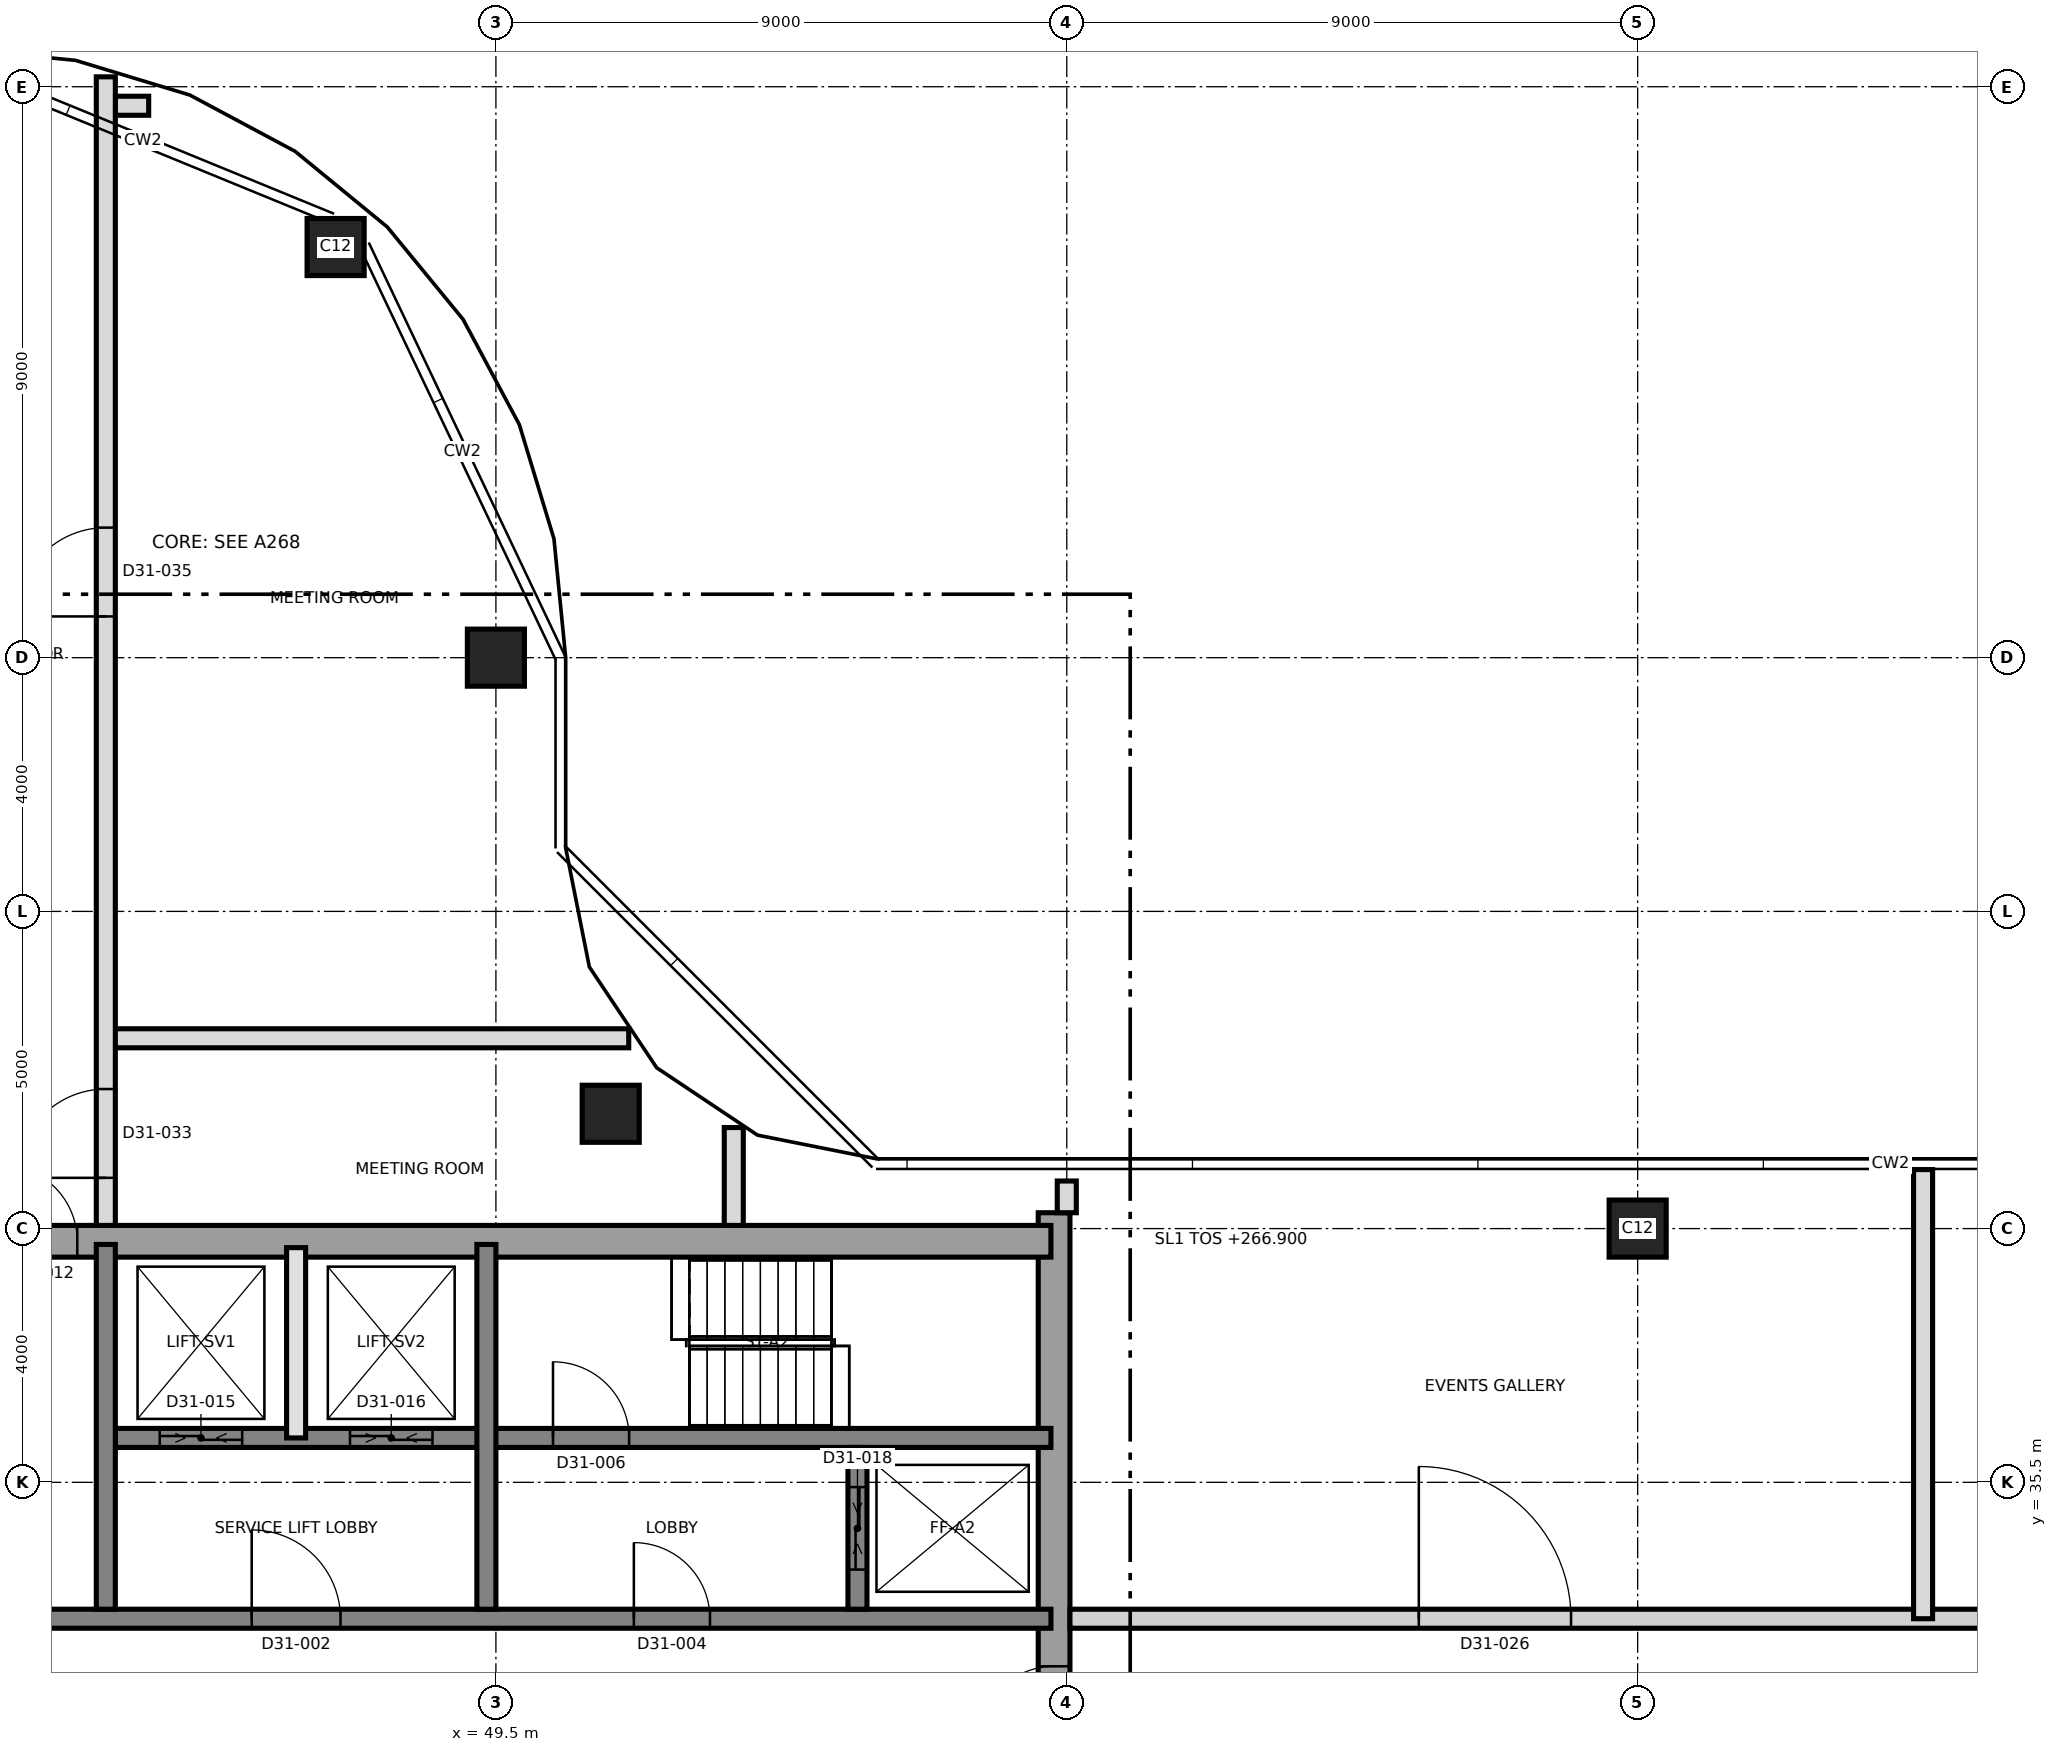
"""IFC4 building model, lengths in metres.
Left out: names, types, materials, properties, quantities, classifications, styles, units other than length and angle.
Written with IfcOpenShell. Run it as: python <this file> out.ifc"""

import sys

from ifc_helpers import new_model, si_unit, direction, frame, frame_2d, origin, origin_2d, place, context, subcontext, project, spatial, rectangle, extrude, element, fill, save


model = new_model("IFC4")
c1 = context("Model", 3, precision=1e-05, world=origin(), true_north=direction((0.0, 1.0)))
c2 = subcontext(c1, "Body", "Model", "MODEL_VIEW")
j1 = project(units=[si_unit("LENGTHUNIT", "METRE"), si_unit("PLANEANGLEUNIT", "RADIAN")], contexts=[c1])
p1 = place(None, origin())
s1 = spatial("IfcSite", under=j1, at=p1, CompositionType="ELEMENT")
p2 = place(p1, origin())
s2 = spatial("IfcBuilding", under=s1, at=p2, CompositionType="ELEMENT")
p3 = place(p2, frame((0.0, 0.0, 266.9)))
s3 = spatial("IfcBuildingStorey", under=s2, at=p3, CompositionType="ELEMENT", Elevation=266.9)
p4 = place(p3, frame((58.3, 21.25, 0.0), z_axis=(0.0, 0.0, 1.0), x_axis=(0.0, 1.0, 0.0)))
e1 = element("IfcWall", 1, at=p4, inside=s3, PredefinedType="SHEAR", context=c2, shape_type="SweptSolid", body=[
    extrude(rectangle(XDim=18.5, YDim=0.5, at=frame_2d((9.25, 0.0))), origin(), (0.0, 0.0, 1.0), 6.0),
])
p5 = place(p4, frame((10.15, 0.0, 0.0)))
e2 = element("IfcOpeningElement", 2, at=p5, cuts=e1, PredefinedType="OPENING", context=c2, shape_type="SweptSolid", body=[
    extrude(rectangle(XDim=1.2, YDim=2.1, at=frame_2d((0.6, 1.05))), frame((0.0, 0.26, 0.0), z_axis=(0.0, -1.0, 0.0), x_axis=(1.0, 0.0, 0.0)), (0.0, 0.0, 1.0), 0.52),
])
p6 = place(p3, frame((31.25, 39.3, 0.0), z_axis=(0.0, 0.0, 1.0), x_axis=(1.0, 0.0, 0.0)))
e3 = element("IfcWall", 3, at=p6, inside=s3, PredefinedType="SHEAR", context=c2, shape_type="SweptSolid", body=[
    extrude(rectangle(XDim=27.0, YDim=0.5, at=frame_2d((13.5, 0.0))), origin(), (0.0, 0.0, 1.0), 6.0),
])
p7 = place(p6, frame((10.45, 0.0, 0.0)))
e4 = element("IfcOpeningElement", 4, at=p7, cuts=e3, PredefinedType="OPENING", context=c2, shape_type="SweptSolid", body=[
    extrude(rectangle(XDim=1.2, YDim=2.1, at=frame_2d((0.6, 1.05))), frame((0.0, 0.26, 0.0), z_axis=(0.0, -1.0, 0.0), x_axis=(1.0, 0.0, 0.0)), (0.0, 0.0, 1.0), 0.52),
])
p8 = place(p3, frame((31.75, 33.35, 0.0), z_axis=(0.0, 0.0, 1.0), x_axis=(1.0, 0.0, 0.0)))
e5 = element("IfcWall", 5, at=p8, inside=s3, PredefinedType="SHEAR", context=c2, shape_type="SweptSolid", body=[
    extrude(rectangle(XDim=26.5, YDim=0.3, at=frame_2d((13.25, 0.0))), origin(), (0.0, 0.0, 1.0), 6.0),
])
p9 = place(p8, frame((13.9, 0.0, 0.0)))
e6 = element("IfcOpeningElement", 6, at=p9, cuts=e5, PredefinedType="OPENING", context=c2, shape_type="SweptSolid", body=[
    extrude(rectangle(XDim=1.4, YDim=2.1, at=frame_2d((0.7, 1.05))), frame((0.0, 0.16, 0.0), z_axis=(0.0, -1.0, 0.0), x_axis=(1.0, 0.0, 0.0)), (0.0, 0.0, 1.0), 0.32),
])
p10 = place(p8, frame((5.375, 0.0, 0.0)))
e7 = element("IfcOpeningElement", 7, at=p10, cuts=e5, PredefinedType="OPENING", context=c2, shape_type="SweptSolid", body=[
    extrude(rectangle(XDim=1.2, YDim=2.1, at=frame_2d((0.6, 1.05))), frame((0.0, 0.16, 0.0), z_axis=(0.0, -1.0, 0.0), x_axis=(1.0, 0.0, 0.0)), (0.0, 0.0, 1.0), 0.32),
])
p11 = place(p8, frame((19.925, 0.0, 0.0)))
e8 = element("IfcOpeningElement", 8, at=p11, cuts=e5, PredefinedType="OPENING", context=c2, shape_type="SweptSolid", body=[
    extrude(rectangle(XDim=1.2, YDim=2.1, at=frame_2d((0.6, 1.05))), frame((0.0, 0.16, 0.0), z_axis=(0.0, -1.0, 0.0), x_axis=(1.0, 0.0, 0.0)), (0.0, 0.0, 1.0), 0.32),
])
p12 = place(p3, frame((43.5, 36.2, 0.0), z_axis=(0.0, 0.0, 1.0), x_axis=(1.0, 0.0, 0.0)))
e9 = element("IfcWall", 9, at=p12, inside=s3, PredefinedType="SHEAR", context=c2, shape_type="SweptSolid", body=[
    extrude(rectangle(XDim=14.75, YDim=0.3, at=frame_2d((7.375, 0.0))), origin(), (0.0, 0.0, 1.0), 6.0),
])
p13 = place(p12, frame((6.9, 0.0, 0.0)))
e10 = element("IfcOpeningElement", 10, at=p13, cuts=e9, PredefinedType="OPENING", context=c2, shape_type="SweptSolid", body=[
    extrude(rectangle(XDim=1.2, YDim=2.1, at=frame_2d((0.6, 1.05))), frame((0.0, 0.16, 0.0), z_axis=(0.0, -1.0, 0.0), x_axis=(1.0, 0.0, 0.0)), (0.0, 0.0, 1.0), 0.32),
])
p14 = place(p12, frame((0.7, 0.0, 0.0)))
e11 = element("IfcOpeningElement", 11, at=p14, cuts=e9, PredefinedType="OPENING", context=c2, shape_type="SweptSolid", body=[
    extrude(rectangle(XDim=1.3, YDim=2.4, at=frame_2d((0.65, 1.2))), frame((0.0, 0.16, 0.0), z_axis=(0.0, -1.0, 0.0), x_axis=(1.0, 0.0, 0.0)), (0.0, 0.0, 1.0), 0.32),
])
p15 = place(p12, frame((3.7, 0.0, 0.0)))
e12 = element("IfcOpeningElement", 12, at=p15, cuts=e9, PredefinedType="OPENING", context=c2, shape_type="SweptSolid", body=[
    extrude(rectangle(XDim=1.3, YDim=2.4, at=frame_2d((0.65, 1.2))), frame((0.0, 0.16, 0.0), z_axis=(0.0, -1.0, 0.0), x_axis=(1.0, 0.0, 0.0)), (0.0, 0.0, 1.0), 0.32),
])
for number, where, z_axis, x_axis in (
    (13, (43.35, 33.5, 0.0), (0.0, 0.0, 1.0), (0.0, 1.0, 0.0)),
    (14, (49.35, 33.5, 0.0), (0.0, 0.0, 1.0), (0.0, 1.0, 0.0)),
):
    element("IfcWall", number, at=place(p3, frame(where, z_axis=z_axis, x_axis=x_axis)), inside=s3, PredefinedType="SHEAR", context=c2, shape_type="SweptSolid", body=[
        extrude(rectangle(XDim=5.75, YDim=0.3, at=frame_2d((2.875, 0.0))), origin(), (0.0, 0.0, 1.0), 6.0),
    ])
p16 = place(p3, frame((55.2, 33.5, 0.0), z_axis=(0.0, 0.0, 1.0), x_axis=(0.0, 1.0, 0.0)))
e15 = element("IfcWall", 15, at=p16, inside=s3, PredefinedType="SHEAR", context=c2, shape_type="SweptSolid", body=[
    extrude(rectangle(XDim=2.55, YDim=0.3, at=frame_2d((1.275, 0.0))), origin(), (0.0, 0.0, 1.0), 6.0),
])
p17 = place(p16, frame((0.625, 0.0, 0.0)))
e16 = element("IfcOpeningElement", 16, at=p17, cuts=e15, PredefinedType="OPENING", context=c2, shape_type="SweptSolid", body=[
    extrude(rectangle(XDim=1.3, YDim=2.4, at=frame_2d((0.65, 1.2))), frame((0.0, 0.16, 0.0), z_axis=(0.0, -1.0, 0.0), x_axis=(1.0, 0.0, 0.0)), (0.0, 0.0, 1.0), 0.32),
])
for number, where, z_axis, x_axis in (
    (17, (67.5, 39.5, 0.0), (0.0, 0.0, 1.0), (1.0, 0.0, 0.0)),
    (18, (51.31, 41.31, 0.0), (0.0, 0.0, 1.0), (1.0, 0.0, 0.0)),
    (19, (49.5, 48.5, 0.0), (0.0, 0.0, 1.0), (1.0, 0.0, 0.0)),
    (20, (46.973, 54.973, 0.0), (0.0, 0.0, 1.0), (1.0, 0.0, 0.0)),
):
    element("IfcColumn", number, at=place(p3, frame(where, z_axis=z_axis, x_axis=x_axis)), inside=s3, PredefinedType="COLUMN", context=c2, shape_type="SweptSolid", body=[
        extrude(rectangle(XDim=0.9, YDim=0.9, at=origin_2d()), origin(), (0.0, 0.0, 1.0), 6.0),
    ])
p18 = place(p3, frame((46.35, 36.2, 0.0), z_axis=(0.0, 0.0, 1.0), x_axis=(0.0, 1.0, 0.0)))
e21 = element("IfcWall", 21, at=p18, inside=s3, PredefinedType="SOLIDWALL", context=c2, shape_type="SweptSolid", body=[
    extrude(rectangle(XDim=3.0, YDim=0.3, at=frame_2d((1.5, 0.0))), origin(), (0.0, 0.0, 1.0), 5.7),
])
p19 = place(p3, frame((58.55, 33.35, 0.0), z_axis=(0.0, 0.0, 1.0), x_axis=(1.0, 0.0, 0.0)))
e22 = element("IfcWall", 22, at=p19, inside=s3, PredefinedType="PARTITIONING", context=c2, shape_type="SweptSolid", body=[
    extrude(rectangle(XDim=26.78, YDim=0.3, at=frame_2d((13.39, 0.0))), origin(), (0.0, 0.0, 1.0), 5.7),
])
p20 = place(p19, frame((5.5, 0.0, 0.0)))
e23 = element("IfcOpeningElement", 23, at=p20, cuts=e22, PredefinedType="OPENING", context=c2, shape_type="SweptSolid", body=[
    extrude(rectangle(XDim=2.4, YDim=2.4, at=frame_2d((1.2, 1.2))), frame((0.0, 0.16, 0.0), z_axis=(0.0, -1.0, 0.0), x_axis=(1.0, 0.0, 0.0)), (0.0, 0.0, 1.0), 0.32),
])
p21 = place(p19, frame((19.0, 0.0, 0.0)))
e24 = element("IfcOpeningElement", 24, at=p21, cuts=e22, PredefinedType="OPENING", context=c2, shape_type="SweptSolid", body=[
    extrude(rectangle(XDim=2.4, YDim=2.4, at=frame_2d((1.2, 1.2))), frame((0.0, 0.16, 0.0), z_axis=(0.0, -1.0, 0.0), x_axis=(1.0, 0.0, 0.0)), (0.0, 0.0, 1.0), 0.32),
])
p22 = place(p3, frame((43.35, 42.5, 0.0), z_axis=(0.0, 0.0, 1.0), x_axis=(1.0, 0.0, 0.0)))
e25 = element("IfcWall", 25, at=p22, inside=s3, PredefinedType="PARTITIONING", context=c2, shape_type="SweptSolid", body=[
    extrude(rectangle(XDim=8.244, YDim=0.3, at=frame_2d((4.122, 0.0))), origin(), (0.0, 0.0, 1.0), 5.65),
])
p23 = place(p3, frame((43.498, 57.2, 0.0), z_axis=(0.0, 0.0, 1.0), x_axis=(1.0, 0.0, 0.0)))
e26 = element("IfcWall", 26, at=p23, inside=s3, PredefinedType="PARTITIONING", context=c2, shape_type="SweptSolid", body=[
    extrude(rectangle(XDim=0.528, YDim=0.3, at=frame_2d((0.264, 0.0))), origin(), (0.0, 0.0, 1.0), 5.65),
])
p24 = place(p3, frame((43.35, 39.55, 0.0), z_axis=(0.0, 0.0, 1.0), x_axis=(0.0, 1.0, 0.0)))
e27 = element("IfcWall", 27, at=p24, inside=s3, PredefinedType="PARTITIONING", context=c2, shape_type="SweptSolid", body=[
    extrude(rectangle(XDim=18.106, YDim=0.3, at=frame_2d((9.053, 0.0))), origin(), (0.0, 0.0, 1.0), 5.65),
])
p25 = place(p24, frame((0.75, 0.0, 0.0)))
e28 = element("IfcOpeningElement", 28, at=p25, cuts=e27, PredefinedType="OPENING", context=c2, shape_type="SweptSolid", body=[
    extrude(rectangle(XDim=1.4, YDim=2.1, at=frame_2d((0.7, 1.05))), frame((0.0, 0.16, 0.0), z_axis=(0.0, -1.0, 0.0), x_axis=(1.0, 0.0, 0.0)), (0.0, 0.0, 1.0), 0.32),
])
p26 = place(p24, frame((9.6, 0.0, 0.0)))
e29 = element("IfcOpeningElement", 29, at=p26, cuts=e27, PredefinedType="OPENING", context=c2, shape_type="SweptSolid", body=[
    extrude(rectangle(XDim=1.4, YDim=2.1, at=frame_2d((0.7, 1.05))), frame((0.0, 0.16, 0.0), z_axis=(0.0, -1.0, 0.0), x_axis=(1.0, 0.0, 0.0)), (0.0, 0.0, 1.0), 0.32),
])
p27 = place(p3, frame((53.25, 39.55, 0.0), z_axis=(0.0, 0.0, 1.0), x_axis=(0.0, 1.0, 0.0)))
e30 = element("IfcWall", 30, at=p27, inside=s3, PredefinedType="PARTITIONING", context=c2, shape_type="SweptSolid", body=[
    extrude(rectangle(XDim=1.543, YDim=0.3, at=frame_2d((0.771, 0.0))), origin(), (0.0, 0.0, 1.0), 5.65),
])
p28 = place(p3, frame((58.5, 39.75, 0.0), z_axis=(0.0, 0.0, 1.0), x_axis=(0.0, 1.0, 0.0)))
e31 = element("IfcWall", 31, at=p28, inside=s3, PredefinedType="PARTITIONING", context=c2, shape_type="SweptSolid", body=[
    extrude(rectangle(XDim=0.5, YDim=0.3, at=frame_2d((0.25, 0.0))), origin(), (0.0, 0.0, 1.0), 5.7),
])
p29 = place(p3, frame((72.0, 33.35, 0.0), z_axis=(0.0, 0.0, 1.0), x_axis=(0.0, 1.0, 0.0)))
e32 = element("IfcWall", 32, at=p29, inside=s3, PredefinedType="PARTITIONING", context=c2, shape_type="SweptSolid", body=[
    extrude(rectangle(XDim=7.08, YDim=0.3, at=frame_2d((3.54, 0.0))), origin(), (0.0, 0.0, 1.0), 5.7),
])
p30 = place(p9, origin())
e33 = element("IfcDoor", 33, at=p30, inside=s3, OperationType="SINGLE_SWING_RIGHT", PredefinedType="DOOR", context=c2, shape_type="SweptSolid", body=[
    extrude(rectangle(XDim=1.4, YDim=2.1, at=frame_2d((0.7, 1.05))), frame((0.0, 0.025, 0.0), z_axis=(0.0, -1.0, 0.0), x_axis=(1.0, 0.0, 0.0)), (0.0, 0.0, 1.0), 0.05),
])
fill(e6, e33)
p31 = place(p11, origin())
e34 = element("IfcDoor", 34, at=p31, inside=s3, OperationType="SINGLE_SWING_RIGHT", PredefinedType="DOOR", context=c2, shape_type="SweptSolid", body=[
    extrude(rectangle(XDim=1.2, YDim=2.1, at=frame_2d((0.6, 1.05))), frame((0.0, 0.025, 0.0), z_axis=(0.0, -1.0, 0.0), x_axis=(1.0, 0.0, 0.0)), (0.0, 0.0, 1.0), 0.05),
])
fill(e8, e34)
p32 = place(p13, origin())
e35 = element("IfcDoor", 35, at=p32, inside=s3, OperationType="SINGLE_SWING_LEFT", PredefinedType="DOOR", context=c2, shape_type="SweptSolid", body=[
    extrude(rectangle(XDim=1.2, YDim=2.1, at=frame_2d((0.6, 1.05))), frame((0.0, 0.025, 0.0), z_axis=(0.0, -1.0, 0.0), x_axis=(1.0, 0.0, 0.0)), (0.0, 0.0, 1.0), 0.05),
])
fill(e10, e35)
p33 = place(p5, origin())
e36 = element("IfcDoor", 36, at=p33, inside=s3, OperationType="SINGLE_SWING_LEFT", PredefinedType="DOOR", context=c2, shape_type="SweptSolid", body=[
    extrude(rectangle(XDim=1.2, YDim=2.1, at=frame_2d((0.6, 1.05))), frame((0.0, 0.025, 0.0), z_axis=(0.0, -1.0, 0.0), x_axis=(1.0, 0.0, 0.0)), (0.0, 0.0, 1.0), 0.05),
])
fill(e2, e36)
p34 = place(p7, origin())
e37 = element("IfcDoor", 37, at=p34, inside=s3, OperationType="SINGLE_SWING_RIGHT", PredefinedType="DOOR", context=c2, shape_type="SweptSolid", body=[
    extrude(rectangle(XDim=1.2, YDim=2.1, at=frame_2d((0.6, 1.05))), frame((0.0, 0.025, 0.0), z_axis=(0.0, -1.0, 0.0), x_axis=(1.0, 0.0, 0.0)), (0.0, 0.0, 1.0), 0.05),
])
fill(e4, e37)
p35 = place(p14, origin())
e38 = element("IfcDoor", 38, at=p35, inside=s3, OperationType="SLIDING_TO_LEFT", PredefinedType="DOOR", context=c2, shape_type="SweptSolid", body=[
    extrude(rectangle(XDim=1.3, YDim=2.4, at=frame_2d((0.65, 1.2))), frame((0.0, 0.025, 0.0), z_axis=(0.0, -1.0, 0.0), x_axis=(1.0, 0.0, 0.0)), (0.0, 0.0, 1.0), 0.05),
])
fill(e11, e38)
p36 = place(p15, origin())
e39 = element("IfcDoor", 39, at=p36, inside=s3, OperationType="SLIDING_TO_LEFT", PredefinedType="DOOR", context=c2, shape_type="SweptSolid", body=[
    extrude(rectangle(XDim=1.3, YDim=2.4, at=frame_2d((0.65, 1.2))), frame((0.0, 0.025, 0.0), z_axis=(0.0, -1.0, 0.0), x_axis=(1.0, 0.0, 0.0)), (0.0, 0.0, 1.0), 0.05),
])
fill(e12, e39)
p37 = place(p17, origin())
e40 = element("IfcDoor", 40, at=p37, inside=s3, OperationType="SLIDING_TO_LEFT", PredefinedType="DOOR", context=c2, shape_type="SweptSolid", body=[
    extrude(rectangle(XDim=1.3, YDim=2.4, at=frame_2d((0.65, 1.2))), frame((0.0, 0.025, 0.0), z_axis=(0.0, -1.0, 0.0), x_axis=(1.0, 0.0, 0.0)), (0.0, 0.0, 1.0), 0.05),
])
fill(e16, e40)
p38 = place(p20, origin())
e41 = element("IfcDoor", 41, at=p38, inside=s3, OperationType="SINGLE_SWING_LEFT", PredefinedType="DOOR", context=c2, shape_type="SweptSolid", body=[
    extrude(rectangle(XDim=2.4, YDim=2.4, at=frame_2d((1.2, 1.2))), frame((0.0, 0.025, 0.0), z_axis=(0.0, -1.0, 0.0), x_axis=(1.0, 0.0, 0.0)), (0.0, 0.0, 1.0), 0.05),
])
fill(e23, e41)
p39 = place(p25, origin())
e42 = element("IfcDoor", 42, at=p39, inside=s3, OperationType="SINGLE_SWING_LEFT", PredefinedType="DOOR", context=c2, shape_type="SweptSolid", body=[
    extrude(rectangle(XDim=1.4, YDim=2.1, at=frame_2d((0.7, 1.05))), frame((0.0, 0.025, 0.0), z_axis=(0.0, -1.0, 0.0), x_axis=(1.0, 0.0, 0.0)), (0.0, 0.0, 1.0), 0.05),
])
fill(e28, e42)
p40 = place(p26, origin())
e43 = element("IfcDoor", 43, at=p40, inside=s3, OperationType="SINGLE_SWING_LEFT", PredefinedType="DOOR", context=c2, shape_type="SweptSolid", body=[
    extrude(rectangle(XDim=1.4, YDim=2.1, at=frame_2d((0.7, 1.05))), frame((0.0, 0.025, 0.0), z_axis=(0.0, -1.0, 0.0), x_axis=(1.0, 0.0, 0.0)), (0.0, 0.0, 1.0), 0.05),
])
fill(e29, e43)
save(model, sys.argv[1])
